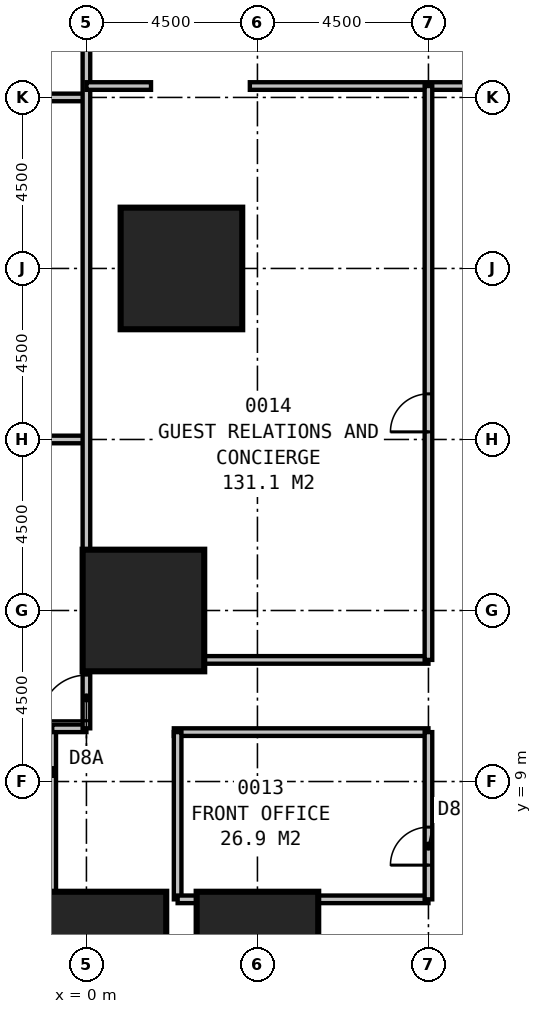
"""IFC4 building model, lengths in metres.
Left out: names, types, materials, properties, quantities, classifications, styles, units other than length and angle.
Written with IfcOpenShell. Run it as: python <this file> out.ifc"""

import sys

from ifc_helpers import new_model, si_unit, direction, frame, frame_2d, origin, origin_2d, place, context, subcontext, project, spatial, rectangle, extrude, element, fill, save


model = new_model("IFC4")
c1 = context("Model", 3, precision=1e-05, world=origin(), true_north=direction((0.0, 1.0)))
c2 = subcontext(c1, "Body", "Model", "MODEL_VIEW")
j1 = project(units=[si_unit("LENGTHUNIT", "METRE"), si_unit("PLANEANGLEUNIT", "RADIAN")], contexts=[c1])
p1 = place(None, origin())
s1 = spatial("IfcSite", under=j1, at=p1, CompositionType="ELEMENT")
p2 = place(p1, origin())
s2 = spatial("IfcBuilding", under=s1, at=p2, CompositionType="ELEMENT")
p3 = place(p2, origin())
s3 = spatial("IfcBuildingStorey", under=s2, at=p3, CompositionType="ELEMENT", Elevation=0.0)
for number, where, z_axis, x_axis in (
    (1, (0.5, 4.5, 0.0), (0.0, 0.0, 1.0), (1.0, 0.0, 0.0)),
    (2, (4.5, 4.5, 0.0), (0.0, 0.0, 1.0), (1.0, 0.0, 0.0)),
    (3, (2.5, 22.5, 0.0), (0.0, 0.0, 1.0), (1.0, 0.0, 0.0)),
    (4, (1.5, 13.5, 0.0), (0.0, 0.0, 1.0), (1.0, 0.0, 0.0)),
):
    element("IfcColumn", number, at=place(p3, frame(where, z_axis=z_axis, x_axis=x_axis)), inside=s3, PredefinedType="COLUMN", context=c2, shape_type="SweptSolid", body=[
        extrude(rectangle(XDim=3.2, YDim=3.2, at=origin_2d()), origin(), (0.0, 0.0, 1.0), 6.0),
    ])
p4 = place(p3, frame((-0.9, -13.5, 0.0), z_axis=(0.0, 0.0, 1.0), x_axis=(0.0, 1.0, 0.0)))
e5 = element("IfcWall", 5, at=p4, inside=s3, PredefinedType="PARTITIONING", context=c2, shape_type="SweptSolid", body=[
    extrude(rectangle(XDim=23.9, YDim=0.2, at=frame_2d((11.95, 0.0))), origin(), (0.0, 0.0, 1.0), 4.8),
])
p5 = place(p3, frame((-0.9, 10.4, 0.0), z_axis=(0.0, 0.0, 1.0), x_axis=(1.0, 0.0, 0.0)))
e6 = element("IfcWall", 6, at=p5, inside=s3, PredefinedType="PARTITIONING", context=c2, shape_type="SweptSolid", body=[
    extrude(rectangle(XDim=0.9, YDim=0.2, at=frame_2d((0.45, 0.0))), origin(), (0.0, 0.0, 1.0), 5.7),
])
p6 = place(p3, frame((0.0, 10.4, 0.0), z_axis=(0.0, 0.0, 1.0), x_axis=(0.0, 1.0, 0.0)))
e7 = element("IfcWall", 7, at=p6, inside=s3, PredefinedType="PARTITIONING", context=c2, shape_type="SweptSolid", body=[
    extrude(rectangle(XDim=30.1, YDim=0.2, at=frame_2d((15.05, 0.0))), origin(), (0.0, 0.0, 1.0), 5.7),
])
p7 = place(p6, frame((0.2, 0.0, 0.0)))
e8 = element("IfcOpeningElement", 8, at=p7, cuts=e7, PredefinedType="OPENING", context=c2, shape_type="SweptSolid", body=[
    extrude(rectangle(XDim=1.2, YDim=2.1, at=frame_2d((0.6, 1.05))), frame((0.0, 0.11, 0.0), z_axis=(0.0, -1.0, 0.0), x_axis=(1.0, 0.0, 0.0)), (0.0, 0.0, 1.0), 0.22),
])
p8 = place(p3, frame((-13.5, 18.0, 0.0), z_axis=(0.0, 0.0, 1.0), x_axis=(1.0, 0.0, 0.0)))
e9 = element("IfcWall", 9, at=p8, inside=s3, PredefinedType="PARTITIONING", context=c2, shape_type="SweptSolid", body=[
    extrude(rectangle(XDim=13.5, YDim=0.2, at=frame_2d((6.75, 0.0))), origin(), (0.0, 0.0, 1.0), 5.7),
])
p9 = place(p8, frame((6.0, 0.0, 0.0)))
e10 = element("IfcOpeningElement", 10, at=p9, cuts=e9, PredefinedType="OPENING", context=c2, shape_type="SweptSolid", body=[
    extrude(rectangle(XDim=1.0, YDim=2.1, at=frame_2d((0.5, 1.05))), frame((0.0, 0.11, 0.0), z_axis=(0.0, -1.0, 0.0), x_axis=(1.0, 0.0, 0.0)), (0.0, 0.0, 1.0), 0.22),
])
p10 = place(p8, frame((10.5, 0.0, 0.0)))
e11 = element("IfcOpeningElement", 11, at=p10, cuts=e9, PredefinedType="OPENING", context=c2, shape_type="SweptSolid", body=[
    extrude(rectangle(XDim=1.0, YDim=2.1, at=frame_2d((0.5, 1.05))), frame((0.0, 0.11, 0.0), z_axis=(0.0, -1.0, 0.0), x_axis=(1.0, 0.0, 0.0)), (0.0, 0.0, 1.0), 0.22),
])
p11 = place(p8, frame((1.5, 0.0, 0.0)))
e12 = element("IfcOpeningElement", 12, at=p11, cuts=e9, PredefinedType="OPENING", context=c2, shape_type="SweptSolid", body=[
    extrude(rectangle(XDim=1.0, YDim=2.1, at=frame_2d((0.5, 1.05))), frame((0.0, 0.11, 0.0), z_axis=(0.0, -1.0, 0.0), x_axis=(1.0, 0.0, 0.0)), (0.0, 0.0, 1.0), 0.22),
])
p12 = place(p3, frame((-13.5, 27.0, 0.0), z_axis=(0.0, 0.0, 1.0), x_axis=(1.0, 0.0, 0.0)))
e13 = element("IfcWall", 13, at=p12, inside=s3, PredefinedType="PARTITIONING", context=c2, shape_type="SweptSolid", body=[
    extrude(rectangle(XDim=13.5, YDim=0.2, at=frame_2d((6.75, 0.0))), origin(), (0.0, 0.0, 1.0), 5.7),
])
p13 = place(p12, frame((2.5, 0.0, 0.0), z_axis=(0.0, 0.0, 1.0), x_axis=(-1.0, 0.0, 0.0)))
e14 = element("IfcOpeningElement", 14, at=p13, cuts=e13, PredefinedType="OPENING", context=c2, shape_type="SweptSolid", body=[
    extrude(rectangle(XDim=1.0, YDim=2.1, at=frame_2d((0.5, 1.05))), frame((0.0, 0.11, 0.0), z_axis=(0.0, -1.0, 0.0), x_axis=(1.0, 0.0, 0.0)), (0.0, 0.0, 1.0), 0.22),
])
p14 = place(p3, frame((9.0, 5.9, 0.0), z_axis=(0.0, 0.0, 1.0), x_axis=(0.0, 1.0, 0.0)))
e15 = element("IfcWall", 15, at=p14, inside=s3, PredefinedType="PARTITIONING", context=c2, shape_type="SweptSolid", body=[
    extrude(rectangle(XDim=4.4, YDim=0.2, at=frame_2d((2.2, 0.0))), origin(), (0.0, 0.0, 1.0), 4.7),
])
p15 = place(p14, frame((0.9, 0.0, 0.0)))
e16 = element("IfcOpeningElement", 16, at=p15, cuts=e15, PredefinedType="OPENING", context=c2, shape_type="SweptSolid", body=[
    extrude(rectangle(XDim=1.0, YDim=2.1, at=frame_2d((0.5, 1.05))), frame((0.0, 0.11, 0.0), z_axis=(0.0, -1.0, 0.0), x_axis=(1.0, 0.0, 0.0)), (0.0, 0.0, 1.0), 0.22),
])
p16 = place(p3, frame((2.3, 10.3, 0.0), z_axis=(0.0, 0.0, 1.0), x_axis=(1.0, 0.0, 0.0)))
e17 = element("IfcWall", 17, at=p16, inside=s3, PredefinedType="PARTITIONING", context=c2, shape_type="SweptSolid", body=[
    extrude(rectangle(XDim=6.7, YDim=0.2, at=frame_2d((3.35, 0.0))), origin(), (0.0, 0.0, 1.0), 5.7),
])
p17 = place(p3, frame((2.4, 5.9, 0.0), z_axis=(0.0, 0.0, 1.0), x_axis=(1.0, 0.0, 0.0)))
e18 = element("IfcWall", 18, at=p17, inside=s3, PredefinedType="PARTITIONING", context=c2, shape_type="SweptSolid", body=[
    extrude(rectangle(XDim=6.6, YDim=0.2, at=frame_2d((3.3, 0.0))), origin(), (0.0, 0.0, 1.0), 5.7),
])
p18 = place(p3, frame((2.4, 5.9, 0.0), z_axis=(0.0, 0.0, 1.0), x_axis=(0.0, 1.0, 0.0)))
e19 = element("IfcWall", 19, at=p18, inside=s3, PredefinedType="PARTITIONING", context=c2, shape_type="SweptSolid", body=[
    extrude(rectangle(XDim=4.4, YDim=0.2, at=frame_2d((2.2, 0.0))), origin(), (0.0, 0.0, 1.0), 5.7),
])
p19 = place(p3, frame((2.8, 12.2, 0.0), z_axis=(0.0, 0.0, 1.0), x_axis=(1.0, 0.0, 0.0)))
e20 = element("IfcWall", 20, at=p19, inside=s3, PredefinedType="PARTITIONING", context=c2, shape_type="SweptSolid", body=[
    extrude(rectangle(XDim=6.2, YDim=0.2, at=frame_2d((3.1, 0.0))), origin(), (0.0, 0.0, 1.0), 5.7),
])
p20 = place(p3, frame((9.0, 12.2, 0.0), z_axis=(0.0, 0.0, 1.0), x_axis=(0.0, 1.0, 0.0)))
e21 = element("IfcWall", 21, at=p20, inside=s3, PredefinedType="PARTITIONING", context=c2, shape_type="SweptSolid", body=[
    extrude(rectangle(XDim=15.1, YDim=0.2, at=frame_2d((7.55, 0.0))), origin(), (0.0, 0.0, 1.0), 4.7),
])
p21 = place(p20, frame((6.0, 0.0, 0.0)))
e22 = element("IfcOpeningElement", 22, at=p21, cuts=e21, PredefinedType="OPENING", context=c2, shape_type="SweptSolid", body=[
    extrude(rectangle(XDim=1.0, YDim=2.1, at=frame_2d((0.5, 1.05))), frame((0.0, 0.11, 0.0), z_axis=(0.0, -1.0, 0.0), x_axis=(1.0, 0.0, 0.0)), (0.0, 0.0, 1.0), 0.22),
])
p22 = place(p3, frame((0.0, 27.3, 0.0), z_axis=(0.0, 0.0, 1.0), x_axis=(1.0, 0.0, 0.0)))
e23 = element("IfcWall", 23, at=p22, inside=s3, PredefinedType="PARTITIONING", context=c2, shape_type="SweptSolid", body=[
    extrude(rectangle(XDim=1.7, YDim=0.2, at=frame_2d((0.85, 0.0))), origin(), (0.0, 0.0, 1.0), 5.7),
])
p23 = place(p3, frame((4.3, 27.3, 0.0), z_axis=(0.0, 0.0, 1.0), x_axis=(1.0, 0.0, 0.0)))
e24 = element("IfcWall", 24, at=p23, inside=s3, PredefinedType="PARTITIONING", context=c2, shape_type="SweptSolid", body=[
    extrude(rectangle(XDim=8.9, YDim=0.2, at=frame_2d((4.45, 0.0))), origin(), (0.0, 0.0, 1.0), 4.4),
])
p24 = place(p23, frame((7.5, 0.0, 0.0), z_axis=(0.0, 0.0, 1.0), x_axis=(-1.0, 0.0, 0.0)))
e25 = element("IfcOpeningElement", 25, at=p24, cuts=e24, PredefinedType="OPENING", context=c2, shape_type="SweptSolid", body=[
    extrude(rectangle(XDim=1.8, YDim=2.4, at=frame_2d((0.9, 1.2))), frame((0.0, 0.11, 0.0), z_axis=(0.0, -1.0, 0.0), x_axis=(1.0, 0.0, 0.0)), (0.0, 0.0, 1.0), 0.22),
])
p25 = place(p7, origin())
e26 = element("IfcDoor", 26, at=p25, inside=s3, OperationType="SINGLE_SWING_LEFT", PredefinedType="DOOR", context=c2, shape_type="SweptSolid", body=[
    extrude(rectangle(XDim=1.2, YDim=2.1, at=frame_2d((0.6, 1.05))), frame((0.0, 0.025, 0.0), z_axis=(0.0, -1.0, 0.0), x_axis=(1.0, 0.0, 0.0)), (0.0, 0.0, 1.0), 0.05),
])
fill(e8, e26)
p26 = place(p15, origin())
e27 = element("IfcDoor", 27, at=p26, inside=s3, OperationType="SINGLE_SWING_LEFT", PredefinedType="DOOR", context=c2, shape_type="SweptSolid", body=[
    extrude(rectangle(XDim=1.0, YDim=2.1, at=frame_2d((0.5, 1.05))), frame((0.0, 0.025, 0.0), z_axis=(0.0, -1.0, 0.0), x_axis=(1.0, 0.0, 0.0)), (0.0, 0.0, 1.0), 0.05),
])
fill(e16, e27)
p27 = place(p21, origin())
e28 = element("IfcDoor", 28, at=p27, inside=s3, OperationType="SINGLE_SWING_LEFT", PredefinedType="DOOR", context=c2, shape_type="SweptSolid", body=[
    extrude(rectangle(XDim=1.0, YDim=2.1, at=frame_2d((0.5, 1.05))), frame((0.0, 0.025, 0.0), z_axis=(0.0, -1.0, 0.0), x_axis=(1.0, 0.0, 0.0)), (0.0, 0.0, 1.0), 0.05),
])
fill(e22, e28)
save(model, sys.argv[1])
